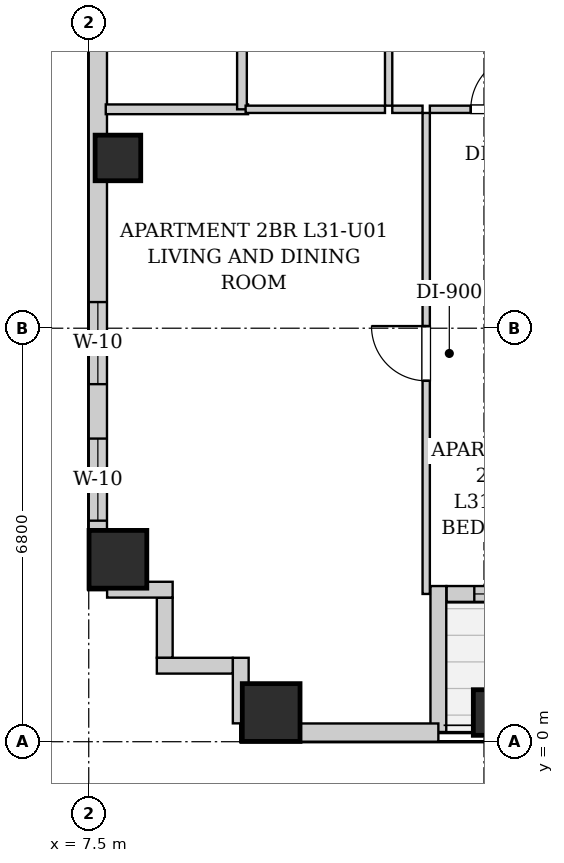
"""IFC4 building model, lengths in metres.
Left out: names, types, materials, properties, quantities, classifications, styles, units other than length and angle.
Written with IfcOpenShell. Run it as: python <this file> out.ifc"""

import sys

from ifc_helpers import new_model, si_unit, direction, frame, frame_2d, origin, origin_2d, place, context, subcontext, project, spatial, rectangle, extrude, element, fill, save


model = new_model("IFC4")
c1 = context("Model", 3, precision=1e-05, world=origin(), true_north=direction((0.0, 1.0)))
c2 = subcontext(c1, "Body", "Model", "MODEL_VIEW")
j1 = project(units=[si_unit("LENGTHUNIT", "METRE"), si_unit("PLANEANGLEUNIT", "RADIAN")], contexts=[c1])
p1 = place(None, origin())
s1 = spatial("IfcSite", under=j1, at=p1, CompositionType="ELEMENT")
p2 = place(p1, origin())
s2 = spatial("IfcBuilding", under=s1, at=p2, CompositionType="ELEMENT")
p3 = place(p2, frame((0.0, 0.0, 110.3)))
s3 = spatial("IfcBuildingStorey", under=s2, at=p3, CompositionType="ELEMENT", Elevation=110.3)
p4 = place(p3, frame((10.5, 0.48, 0.0), z_axis=(0.0, 0.0, 1.0), x_axis=(1.0, 0.0, 0.0)))
e1 = element("IfcColumn", 1, at=p4, inside=s3, PredefinedType="COLUMN", context=c2, shape_type="SweptSolid", body=[
    extrude(rectangle(XDim=0.95, YDim=0.95, at=origin_2d()), origin(), (0.0, 0.0, 1.0), 3.2),
])
p5 = place(p3, frame((14.2, 0.48, 0.0), z_axis=(0.0, 0.0, 1.0), x_axis=(1.0, 0.0, 0.0)))
e2 = element("IfcColumn", 2, at=p5, inside=s3, PredefinedType="COLUMN", context=c2, shape_type="SweptSolid", body=[
    extrude(rectangle(XDim=0.75, YDim=0.75, at=origin_2d()), origin(), (0.0, 0.0, 1.0), 3.2),
])
p6 = place(p3, frame((7.98, 3.0, 0.0), z_axis=(0.0, 0.0, 1.0), x_axis=(1.0, 0.0, 0.0)))
e3 = element("IfcColumn", 3, at=p6, inside=s3, PredefinedType="COLUMN", context=c2, shape_type="SweptSolid", body=[
    extrude(rectangle(XDim=0.95, YDim=0.95, at=origin_2d()), origin(), (0.0, 0.0, 1.0), 3.2),
])
p7 = place(p3, frame((7.98, 9.6, 0.0), z_axis=(0.0, 0.0, 1.0), x_axis=(1.0, 0.0, 0.0)))
e4 = element("IfcColumn", 4, at=p7, inside=s3, PredefinedType="COLUMN", context=c2, shape_type="SweptSolid", body=[
    extrude(rectangle(XDim=0.75, YDim=0.75, at=origin_2d()), origin(), (0.0, 0.0, 1.0), 3.2),
])
p8 = place(p3, frame((18.816, 2.43, 0.0), z_axis=(0.0, 0.0, 1.0), x_axis=(-1.0, 0.0, 0.0)))
e5 = element("IfcWall", 5, at=p8, inside=s3, PredefinedType="SOLIDWALL", context=c2, shape_type="SweptSolid", body=[
    extrude(rectangle(XDim=5.432, YDim=0.26, at=frame_2d((2.716, 0.0))), origin(), (0.0, 0.0, 1.0), 2.94),
])
p9 = place(p8, frame((2.161, 0.0, 0.0)))
e6 = element("IfcOpeningElement", 6, at=p9, cuts=e5, PredefinedType="OPENING", context=c2, shape_type="SweptSolid", body=[
    extrude(rectangle(XDim=1.1, YDim=2.0, at=frame_2d((0.55, 1.0))), frame((0.0, 0.14, 0.0), z_axis=(0.0, -1.0, 0.0), x_axis=(1.0, 0.0, 0.0)), (0.0, 0.0, 1.0), 0.28),
])
p10 = place(p8, frame((3.625, 0.0, 0.85)))
e7 = element("IfcOpeningElement", 7, at=p10, cuts=e5, PredefinedType="OPENING", context=c2, shape_type="SweptSolid", body=[
    extrude(rectangle(XDim=1.35, YDim=1.65, at=frame_2d((0.675, 0.825))), frame((0.0, 0.14, 0.0), z_axis=(0.0, -1.0, 0.0), x_axis=(1.0, 0.0, 0.0)), (0.0, 0.0, 1.0), 0.28),
])
p11 = place(p8, frame((1.321, 0.0, 0.55)))
e8 = element("IfcOpeningElement", 8, at=p11, cuts=e5, PredefinedType="OPENING", context=c2, shape_type="SweptSolid", body=[
    extrude(rectangle(XDim=0.68, YDim=1.2, at=frame_2d((0.34, 0.6))), frame((0.0, 0.14, 0.0), z_axis=(0.0, -1.0, 0.0), x_axis=(1.0, 0.0, 0.0)), (0.0, 0.0, 1.0), 0.28),
])
p12 = place(p3, frame((13.25, 2.56, 0.0), z_axis=(0.0, 0.0, 1.0), x_axis=(0.0, -1.0, 0.0)))
e9 = element("IfcWall", 9, at=p12, inside=s3, PredefinedType="SOLIDWALL", context=c2, shape_type="SweptSolid", body=[
    extrude(rectangle(XDim=2.4, YDim=0.26, at=frame_2d((1.2, 0.0))), origin(), (0.0, 0.0, 1.0), 2.94),
])
p13 = place(p3, frame((13.25, 0.15, 0.0), z_axis=(0.0, 0.0, 1.0), x_axis=(-1.0, 0.0, 0.0)))
e10 = element("IfcWall", 10, at=p13, inside=s3, PredefinedType="SOLIDWALL", context=c2, shape_type="SweptSolid", body=[
    extrude(rectangle(XDim=3.25, YDim=0.3, at=frame_2d((1.625, 0.0))), origin(), (0.0, 0.0, 1.0), 2.94),
])
p14 = place(p3, frame((7.65, 2.5, 0.0), z_axis=(0.0, 0.0, 1.0), x_axis=(0.0, 1.0, 0.0)))
e11 = element("IfcWall", 11, at=p14, inside=s3, PredefinedType="SOLIDWALL", context=c2, shape_type="SweptSolid", body=[
    extrude(rectangle(XDim=38.3, YDim=0.3, at=frame_2d((19.15, 0.0))), origin(), (0.0, 0.0, 1.0), 2.94),
])
p15 = place(p14, frame((3.38, 0.0, 0.55)))
e12 = element("IfcOpeningElement", 12, at=p15, cuts=e11, PredefinedType="OPENING", context=c2, shape_type="SweptSolid", body=[
    extrude(rectangle(XDim=1.35, YDim=1.2, at=frame_2d((0.675, 0.6))), frame((0.0, 0.16, 0.0), z_axis=(0.0, -1.0, 0.0), x_axis=(1.0, 0.0, 0.0)), (0.0, 0.0, 1.0), 0.32),
])
p16 = place(p14, frame((1.135, 0.0, 0.55)))
e13 = element("IfcOpeningElement", 13, at=p16, cuts=e11, PredefinedType="OPENING", context=c2, shape_type="SweptSolid", body=[
    extrude(rectangle(XDim=1.35, YDim=1.2, at=frame_2d((0.675, 0.6))), frame((0.0, 0.16, 0.0), z_axis=(0.0, -1.0, 0.0), x_axis=(1.0, 0.0, 0.0)), (0.0, 0.0, 1.0), 0.32),
])
p17 = place(p14, frame((33.946, 0.0, 0.55)))
e14 = element("IfcOpeningElement", 14, at=p17, cuts=e11, PredefinedType="OPENING", context=c2, shape_type="SweptSolid", body=[
    extrude(rectangle(XDim=1.35, YDim=1.2, at=frame_2d((0.675, 0.6))), frame((0.0, 0.16, 0.0), z_axis=(0.0, -1.0, 0.0), x_axis=(1.0, 0.0, 0.0)), (0.0, 0.0, 1.0), 0.32),
])
p18 = place(p14, frame((32.035, 0.0, 0.55)))
e15 = element("IfcOpeningElement", 15, at=p18, cuts=e11, PredefinedType="OPENING", context=c2, shape_type="SweptSolid", body=[
    extrude(rectangle(XDim=1.35, YDim=1.2, at=frame_2d((0.675, 0.6))), frame((0.0, 0.16, 0.0), z_axis=(0.0, -1.0, 0.0), x_axis=(1.0, 0.0, 0.0)), (0.0, 0.0, 1.0), 0.32),
])
p19 = place(p14, frame((15.65, 0.0, 0.55)))
e16 = element("IfcOpeningElement", 16, at=p19, cuts=e11, PredefinedType="OPENING", context=c2, shape_type="SweptSolid", body=[
    extrude(rectangle(XDim=1.35, YDim=1.2, at=frame_2d((0.675, 0.6))), frame((0.0, 0.16, 0.0), z_axis=(0.0, -1.0, 0.0), x_axis=(1.0, 0.0, 0.0)), (0.0, 0.0, 1.0), 0.32),
])
p20 = place(p14, frame((13.035, 0.0, 0.55)))
e17 = element("IfcOpeningElement", 17, at=p20, cuts=e11, PredefinedType="OPENING", context=c2, shape_type="SweptSolid", body=[
    extrude(rectangle(XDim=1.35, YDim=1.2, at=frame_2d((0.675, 0.6))), frame((0.0, 0.16, 0.0), z_axis=(0.0, -1.0, 0.0), x_axis=(1.0, 0.0, 0.0)), (0.0, 0.0, 1.0), 0.32),
])
p21 = place(p14, frame((22.831, 0.0, 0.55)))
e18 = element("IfcOpeningElement", 18, at=p21, cuts=e11, PredefinedType="OPENING", context=c2, shape_type="SweptSolid", body=[
    extrude(rectangle(XDim=1.35, YDim=1.2, at=frame_2d((0.675, 0.6))), frame((0.0, 0.16, 0.0), z_axis=(0.0, -1.0, 0.0), x_axis=(1.0, 0.0, 0.0)), (0.0, 0.0, 1.0), 0.32),
])
p22 = place(p14, frame((24.441, 0.0, 0.55)))
e19 = element("IfcOpeningElement", 19, at=p22, cuts=e11, PredefinedType="OPENING", context=c2, shape_type="SweptSolid", body=[
    extrude(rectangle(XDim=1.35, YDim=1.2, at=frame_2d((0.675, 0.6))), frame((0.0, 0.16, 0.0), z_axis=(0.0, -1.0, 0.0), x_axis=(1.0, 0.0, 0.0)), (0.0, 0.0, 1.0), 0.32),
])
p23 = place(p3, frame((10.0, 0.302, 0.0), z_axis=(0.0, 0.0, 1.0), x_axis=(0.0, 1.0, 0.0)))
e20 = element("IfcWall", 20, at=p23, inside=s3, PredefinedType="SOLIDWALL", context=c2, shape_type="SweptSolid", body=[
    extrude(rectangle(XDim=1.078, YDim=0.26, at=frame_2d((0.539, 0.0))), origin(), (0.0, 0.0, 1.0), 2.94),
])
p24 = place(p3, frame((9.868, 1.25, 0.0), z_axis=(0.0, 0.0, 1.0), x_axis=(-1.0, 0.0, 0.0)))
e21 = element("IfcWall", 21, at=p24, inside=s3, PredefinedType="SOLIDWALL", context=c2, shape_type="SweptSolid", body=[
    extrude(rectangle(XDim=1.248, YDim=0.26, at=frame_2d((0.624, 0.0))), origin(), (0.0, 0.0, 1.0), 2.94),
])
p25 = place(p3, frame((8.75, 1.382, 0.0), z_axis=(0.0, 0.0, 1.0), x_axis=(0.0, 1.0, 0.0)))
e22 = element("IfcWall", 22, at=p25, inside=s3, PredefinedType="SOLIDWALL", context=c2, shape_type="SweptSolid", body=[
    extrude(rectangle(XDim=0.986, YDim=0.26, at=frame_2d((0.493, 0.0))), origin(), (0.0, 0.0, 1.0), 2.94),
])
p26 = place(p3, frame((8.88, 2.5, 0.0), z_axis=(0.0, 0.0, 1.0), x_axis=(-1.0, 0.0, 0.0)))
e23 = element("IfcWall", 23, at=p26, inside=s3, PredefinedType="SOLIDWALL", context=c2, shape_type="SweptSolid", body=[
    extrude(rectangle(XDim=1.078, YDim=0.26, at=frame_2d((0.539, 0.0))), origin(), (0.0, 0.0, 1.0), 2.94),
])
p27 = place(p3, frame((7.78, 10.4, 0.0), z_axis=(0.0, 0.0, 1.0), x_axis=(1.0, 0.0, 0.0)))
e24 = element("IfcWall", 24, at=p27, inside=s3, PredefinedType="PARTITIONING", context=c2, shape_type="SweptSolid", body=[
    extrude(rectangle(XDim=2.34, YDim=0.16, at=frame_2d((1.17, 0.0))), origin(), (0.0, 0.0, 1.0), 2.94),
])
p28 = place(p3, frame((10.02, 10.4, 0.0), z_axis=(0.0, 0.0, 1.0), x_axis=(0.0, 1.0, 0.0)))
e25 = element("IfcWall", 25, at=p28, inside=s3, PredefinedType="PARTITIONING", context=c2, shape_type="SweptSolid", body=[
    extrude(rectangle(XDim=2.91, YDim=0.16, at=frame_2d((1.455, 0.0))), origin(), (0.0, 0.0, 1.0), 2.94),
])
p29 = place(p3, frame((12.432, 10.46, 0.0), z_axis=(0.0, 0.0, 1.0), x_axis=(0.0, 1.0, 0.0)))
e26 = element("IfcWall", 26, at=p29, inside=s3, PredefinedType="PARTITIONING", context=c2, shape_type="SweptSolid", body=[
    extrude(rectangle(XDim=2.85, YDim=0.12, at=frame_2d((1.425, 0.0))), origin(), (0.0, 0.0, 1.0), 2.94),
])
p30 = place(p29, frame((0.995, 0.0, 0.0)))
e27 = element("IfcOpeningElement", 27, at=p30, cuts=e26, PredefinedType="OPENING", context=c2, shape_type="SweptSolid", body=[
    extrude(rectangle(XDim=0.86, YDim=2.05, at=frame_2d((0.43, 1.025))), frame((0.0, 0.07, 0.0), z_axis=(0.0, -1.0, 0.0), x_axis=(1.0, 0.0, 0.0)), (0.0, 0.0, 1.0), 0.14),
])
p31 = place(p3, frame((10.08, 10.4, 0.0), z_axis=(0.0, 0.0, 1.0), x_axis=(1.0, 0.0, 0.0)))
e28 = element("IfcWall", 28, at=p31, inside=s3, PredefinedType="PARTITIONING", context=c2, shape_type="SweptSolid", body=[
    extrude(rectangle(XDim=2.292, YDim=0.12, at=frame_2d((1.146, 0.0))), origin(), (0.0, 0.0, 1.0), 2.94),
])
p32 = place(p3, frame((12.492, 10.4, 0.0), z_axis=(0.0, 0.0, 1.0), x_axis=(1.0, 0.0, 0.0)))
e29 = element("IfcWall", 29, at=p32, inside=s3, PredefinedType="PARTITIONING", context=c2, shape_type="SweptSolid", body=[
    extrude(rectangle(XDim=0.498, YDim=0.12, at=frame_2d((0.249, 0.0))), origin(), (0.0, 0.0, 1.0), 2.94),
])
p33 = place(p3, frame((13.11, 10.4, 0.0), z_axis=(0.0, 0.0, 1.0), x_axis=(1.0, 0.0, 0.0)))
e30 = element("IfcWall", 30, at=p33, inside=s3, PredefinedType="PARTITIONING", context=c2, shape_type="SweptSolid", body=[
    extrude(rectangle(XDim=2.245, YDim=0.12, at=frame_2d((1.123, 0.0))), origin(), (0.0, 0.0, 1.0), 2.94),
])
p34 = place(p33, frame((0.673, 0.0, 0.0)))
e31 = element("IfcOpeningElement", 31, at=p34, cuts=e30, PredefinedType="OPENING", context=c2, shape_type="SweptSolid", body=[
    extrude(rectangle(XDim=0.9, YDim=2.05, at=frame_2d((0.45, 1.025))), frame((0.0, 0.07, 0.0), z_axis=(0.0, -1.0, 0.0), x_axis=(1.0, 0.0, 0.0)), (0.0, 0.0, 1.0), 0.14),
])
p35 = place(p3, frame((13.05, 2.43, 0.0), z_axis=(0.0, 0.0, 1.0), x_axis=(0.0, 1.0, 0.0)))
e32 = element("IfcWall", 32, at=p35, inside=s3, PredefinedType="PARTITIONING", context=c2, shape_type="SweptSolid", body=[
    extrude(rectangle(XDim=7.91, YDim=0.12, at=frame_2d((3.955, 0.0))), origin(), (0.0, 0.0, 1.0), 2.94),
])
p36 = place(p35, frame((3.505, 0.0, 0.0)))
e33 = element("IfcOpeningElement", 33, at=p36, cuts=e32, PredefinedType="OPENING", context=c2, shape_type="SweptSolid", body=[
    extrude(rectangle(XDim=0.9, YDim=2.05, at=frame_2d((0.45, 1.025))), frame((0.0, 0.07, 0.0), z_axis=(0.0, -1.0, 0.0), x_axis=(1.0, 0.0, 0.0)), (0.0, 0.0, 1.0), 0.14),
])
p37 = place(p34, origin())
e34 = element("IfcDoor", 34, at=p37, inside=s3, OperationType="SINGLE_SWING_RIGHT", PredefinedType="DOOR", context=c2, shape_type="SweptSolid", body=[
    extrude(rectangle(XDim=0.9, YDim=2.05, at=frame_2d((0.45, 1.025))), frame((0.0, 0.025, 0.0), z_axis=(0.0, -1.0, 0.0), x_axis=(1.0, 0.0, 0.0)), (0.0, 0.0, 1.0), 0.05),
])
fill(e31, e34)
p38 = place(p36, origin())
e35 = element("IfcDoor", 35, at=p38, inside=s3, OperationType="SINGLE_SWING_RIGHT", PredefinedType="DOOR", context=c2, shape_type="SweptSolid", body=[
    extrude(rectangle(XDim=0.9, YDim=2.05, at=frame_2d((0.45, 1.025))), frame((0.0, 0.025, 0.0), z_axis=(0.0, -1.0, 0.0), x_axis=(1.0, 0.0, 0.0)), (0.0, 0.0, 1.0), 0.05),
])
fill(e33, e35)
p39 = place(p15, origin())
e36 = element("IfcWindow", 36, at=p39, inside=s3, PartitioningType="SINGLE_PANEL", PredefinedType="WINDOW", context=c2, shape_type="SweptSolid", body=[
    extrude(rectangle(XDim=1.35, YDim=1.2, at=frame_2d((0.675, 0.6))), frame((0.0, 0.03, 0.0), z_axis=(0.0, -1.0, 0.0), x_axis=(1.0, 0.0, 0.0)), (0.0, 0.0, 1.0), 0.06),
])
fill(e12, e36)
p40 = place(p16, origin())
e37 = element("IfcWindow", 37, at=p40, inside=s3, PartitioningType="SINGLE_PANEL", PredefinedType="WINDOW", context=c2, shape_type="SweptSolid", body=[
    extrude(rectangle(XDim=1.35, YDim=1.2, at=frame_2d((0.675, 0.6))), frame((0.0, 0.03, 0.0), z_axis=(0.0, -1.0, 0.0), x_axis=(1.0, 0.0, 0.0)), (0.0, 0.0, 1.0), 0.06),
])
fill(e13, e37)
p41 = place(p10, origin())
e38 = element("IfcWindow", 38, at=p41, inside=s3, PartitioningType="SINGLE_PANEL", PredefinedType="WINDOW", context=c2, shape_type="SweptSolid", body=[
    extrude(rectangle(XDim=1.35, YDim=1.65, at=frame_2d((0.675, 0.825))), frame((0.0, 0.03, 0.0), z_axis=(0.0, -1.0, 0.0), x_axis=(1.0, 0.0, 0.0)), (0.0, 0.0, 1.0), 0.06),
])
fill(e7, e38)
save(model, sys.argv[1])
